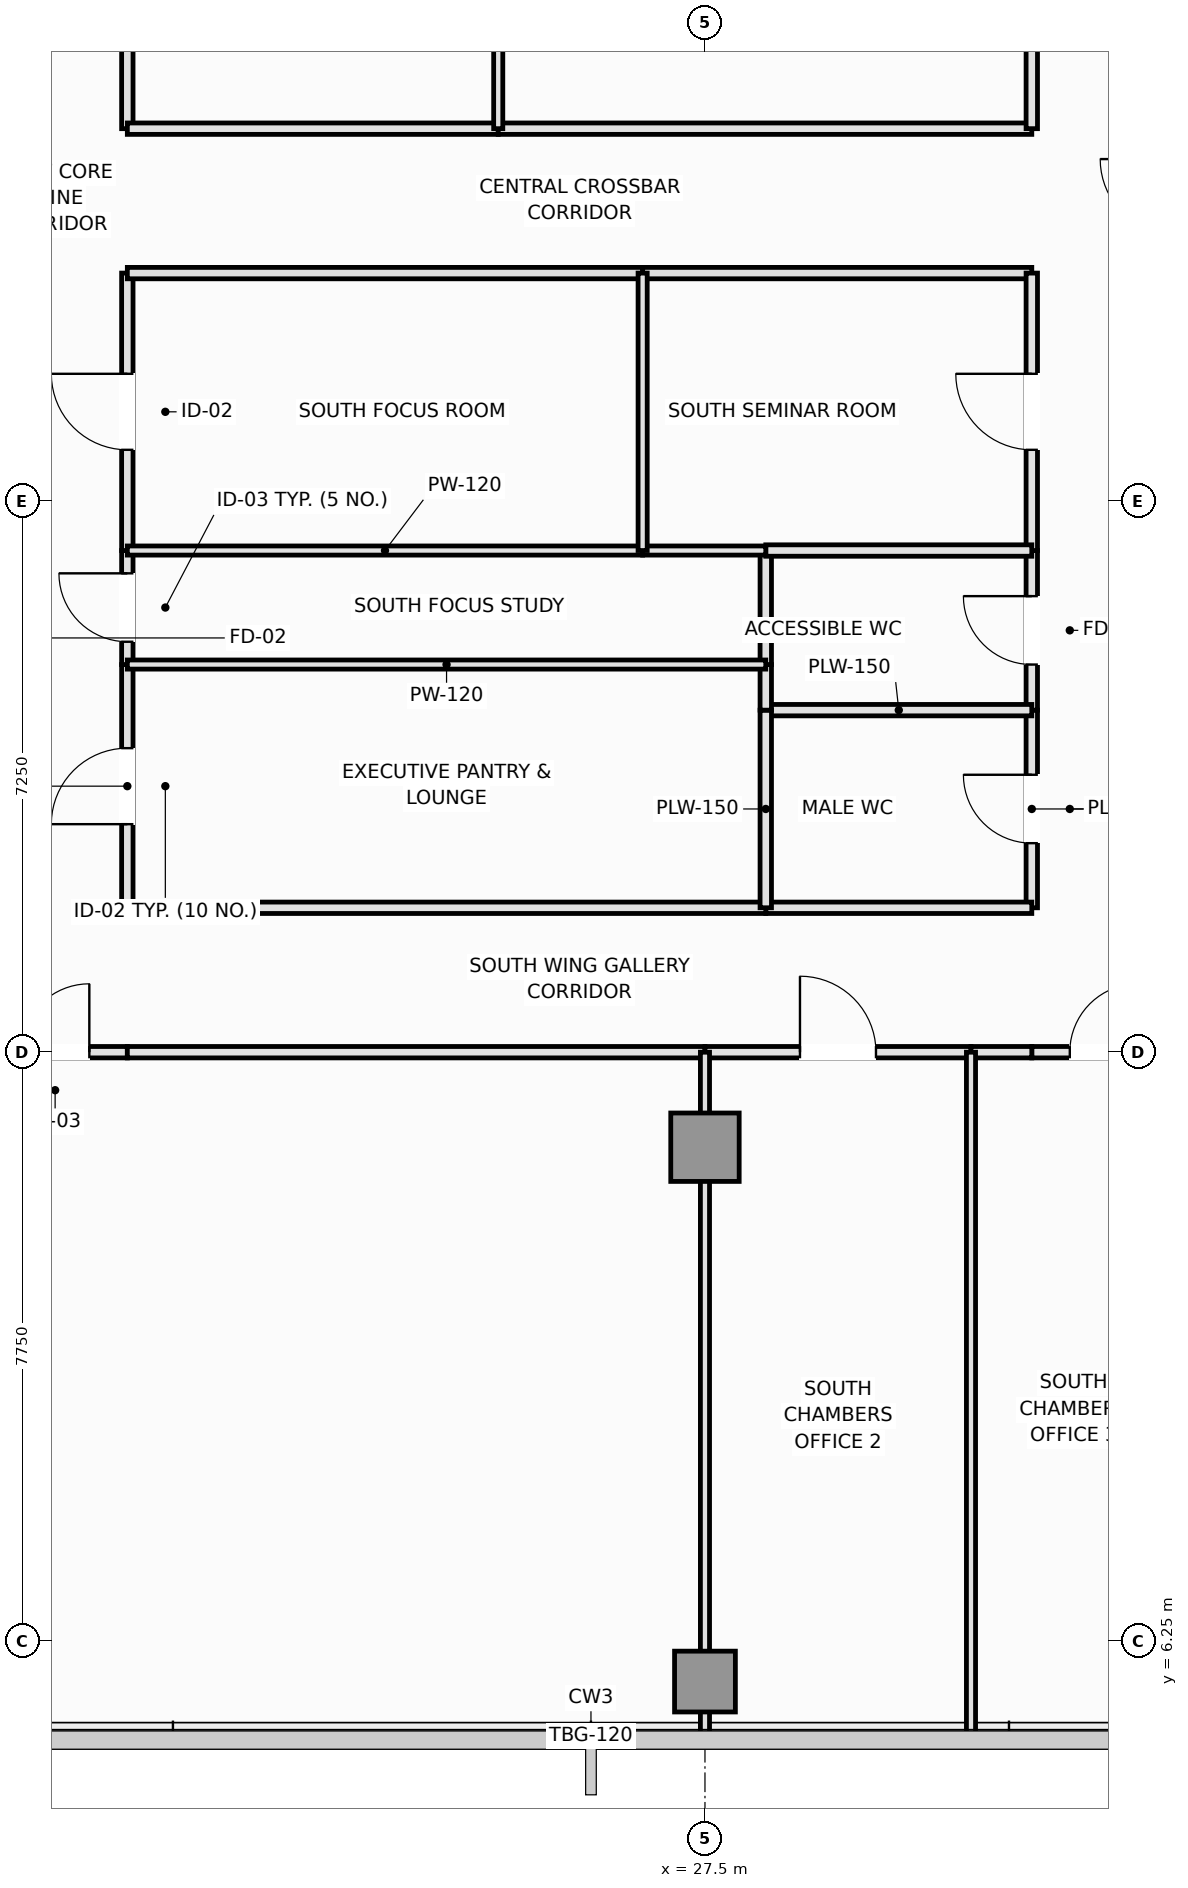
"""IFC4 building model, lengths in metres.
Left out: names, types, materials, properties, quantities, classifications, styles, units other than length and angle.
Written with IfcOpenShell. Run it as: python <this file> out.ifc"""

import sys

from ifc_helpers import new_model, si_unit, direction, frame, frame_2d, origin, origin_2d, place, context, subcontext, project, spatial, rectangle, extrude, element, fill, save


model = new_model("IFC4")
c1 = context("Model", 3, precision=1e-05, world=origin(), true_north=direction((0.0, 1.0)))
c2 = subcontext(c1, "Body", "Model", "MODEL_VIEW")
j1 = project(units=[si_unit("LENGTHUNIT", "METRE"), si_unit("PLANEANGLEUNIT", "RADIAN")], contexts=[c1])
p1 = place(None, origin())
s1 = spatial("IfcSite", under=j1, at=p1, CompositionType="ELEMENT")
p2 = place(p1, origin())
s2 = spatial("IfcBuilding", under=s1, at=p2, CompositionType="ELEMENT")
p3 = place(p2, frame((0.0, 0.0, 212.9)))
s3 = spatial("IfcBuildingStorey", under=s2, at=p3, CompositionType="ELEMENT", Elevation=212.9)
p4 = place(p3, frame((27.5, 12.75, 0.0), z_axis=(0.0, 0.0, 1.0), x_axis=(1.0, 0.0, 0.0)))
e1 = element("IfcColumn", 1, at=p4, inside=s3, PredefinedType="COLUMN", context=c2, shape_type="SweptSolid", body=[
    extrude(rectangle(XDim=0.9, YDim=0.9, at=origin_2d()), origin(), (0.0, 0.0, 1.0), 3.55),
])
p5 = place(p3, frame((27.5, 5.72, 0.0), z_axis=(0.0, 0.0, 1.0), x_axis=(1.0, 0.0, 0.0)))
e2 = element("IfcColumn", 2, at=p5, inside=s3, PredefinedType="COLUMN", context=c2, shape_type="SweptSolid", body=[
    extrude(rectangle(XDim=0.8, YDim=0.8, at=origin_2d()), origin(), (0.0, 0.0, 1.0), 3.55),
])
p6 = place(p3, frame((19.9, 15.9, 0.0), z_axis=(0.0, 0.0, 1.0), x_axis=(0.0, 1.0, 0.0)))
e3 = element("IfcWall", 3, at=p6, inside=s3, PredefinedType="PARTITIONING", context=c2, shape_type="SweptSolid", body=[
    extrude(rectangle(XDim=3.2, YDim=0.15, at=frame_2d((1.6, 0.0))), origin(), (0.0, 0.0, 1.0), 3.37),
])
p7 = place(p6, frame((1.1, 0.0, 0.0)))
e4 = element("IfcOpeningElement", 4, at=p7, cuts=e3, PredefinedType="OPENING", context=c2, shape_type="SweptSolid", body=[
    extrude(rectangle(XDim=1.0, YDim=2.15, at=frame_2d((0.5, 1.075))), frame((0.0, 0.085, 0.0), z_axis=(0.0, -1.0, 0.0), x_axis=(1.0, 0.0, 0.0)), (0.0, 0.0, 1.0), 0.17),
])
p8 = place(p3, frame((19.9, 19.1, 0.0), z_axis=(0.0, 0.0, 1.0), x_axis=(0.0, 1.0, 0.0)))
e5 = element("IfcWall", 5, at=p8, inside=s3, PredefinedType="PARTITIONING", context=c2, shape_type="SweptSolid", body=[
    extrude(rectangle(XDim=1.5, YDim=0.15, at=frame_2d((0.75, 0.0))), origin(), (0.0, 0.0, 1.0), 3.37),
])
p9 = place(p8, frame((0.3, 0.0, 0.0)))
e6 = element("IfcOpeningElement", 6, at=p9, cuts=e5, PredefinedType="OPENING", context=c2, shape_type="SweptSolid", body=[
    extrude(rectangle(XDim=0.9, YDim=2.1, at=frame_2d((0.45, 1.05))), frame((0.0, 0.085, 0.0), z_axis=(0.0, -1.0, 0.0), x_axis=(1.0, 0.0, 0.0)), (0.0, 0.0, 1.0), 0.17),
])
p10 = place(p3, frame((19.9, 20.6, 0.0), z_axis=(0.0, 0.0, 1.0), x_axis=(0.0, 1.0, 0.0)))
e7 = element("IfcWall", 7, at=p10, inside=s3, PredefinedType="PARTITIONING", context=c2, shape_type="SweptSolid", body=[
    extrude(rectangle(XDim=3.65, YDim=0.15, at=frame_2d((1.825, 0.0))), origin(), (0.0, 0.0, 1.0), 3.37),
])
p11 = place(p10, frame((1.325, 0.0, 0.0)))
e8 = element("IfcOpeningElement", 8, at=p11, cuts=e7, PredefinedType="OPENING", context=c2, shape_type="SweptSolid", body=[
    extrude(rectangle(XDim=1.0, YDim=2.15, at=frame_2d((0.5, 1.075))), frame((0.0, 0.085, 0.0), z_axis=(0.0, -1.0, 0.0), x_axis=(1.0, 0.0, 0.0)), (0.0, 0.0, 1.0), 0.17),
])
p12 = place(p3, frame((19.9, 26.15, 0.0), z_axis=(0.0, 0.0, 1.0), x_axis=(0.0, 1.0, 0.0)))
e9 = element("IfcWall", 9, at=p12, inside=s3, PredefinedType="PARTITIONING", context=c2, shape_type="SweptSolid", body=[
    extrude(rectangle(XDim=3.75, YDim=0.15, at=frame_2d((1.875, 0.0))), origin(), (0.0, 0.0, 1.0), 3.37),
])
p13 = place(p12, frame((1.375, 0.0, 0.0)))
e10 = element("IfcOpeningElement", 10, at=p13, cuts=e9, PredefinedType="OPENING", context=c2, shape_type="SweptSolid", body=[
    extrude(rectangle(XDim=1.0, YDim=2.15, at=frame_2d((0.5, 1.075))), frame((0.0, 0.085, 0.0), z_axis=(0.0, -1.0, 0.0), x_axis=(1.0, 0.0, 0.0)), (0.0, 0.0, 1.0), 0.17),
])
p14 = place(p3, frame((18.0, 14.0, 0.0), z_axis=(0.0, 0.0, 1.0), x_axis=(1.0, 0.0, 0.0)))
e11 = element("IfcWall", 11, at=p14, inside=s3, PredefinedType="PARTITIONING", context=c2, shape_type="SweptSolid", body=[
    extrude(rectangle(XDim=1.9, YDim=0.15, at=frame_2d((0.95, 0.0))), origin(), (0.0, 0.0, 1.0), 3.37),
])
p15 = place(p14, frame((0.5, 0.0, 0.0)))
e12 = element("IfcOpeningElement", 12, at=p15, cuts=e11, PredefinedType="OPENING", context=c2, shape_type="SweptSolid", body=[
    extrude(rectangle(XDim=0.9, YDim=2.1, at=frame_2d((0.45, 1.05))), frame((0.0, 0.085, 0.0), z_axis=(0.0, -1.0, 0.0), x_axis=(1.0, 0.0, 0.0)), (0.0, 0.0, 1.0), 0.17),
])
p16 = place(p3, frame((19.9, 24.25, 0.0), z_axis=(0.0, 0.0, 1.0), x_axis=(1.0, 0.0, 0.0)))
e13 = element("IfcWall", 13, at=p16, inside=s3, PredefinedType="PARTITIONING", context=c2, shape_type="SweptSolid", body=[
    extrude(rectangle(XDim=6.78, YDim=0.15, at=frame_2d((3.39, 0.0))), origin(), (0.0, 0.0, 1.0), 3.37),
])
p17 = place(p3, frame((26.68, 24.25, 0.0), z_axis=(0.0, 0.0, 1.0), x_axis=(1.0, 0.0, 0.0)))
e14 = element("IfcWall", 14, at=p17, inside=s3, PredefinedType="PARTITIONING", context=c2, shape_type="SweptSolid", body=[
    extrude(rectangle(XDim=5.12, YDim=0.15, at=frame_2d((2.56, 0.0))), origin(), (0.0, 0.0, 1.0), 3.37),
])
p18 = place(p3, frame((19.9, 26.15, 0.0), z_axis=(0.0, 0.0, 1.0), x_axis=(1.0, 0.0, 0.0)))
e15 = element("IfcWall", 15, at=p18, inside=s3, PredefinedType="PARTITIONING", context=c2, shape_type="SweptSolid", body=[
    extrude(rectangle(XDim=4.88, YDim=0.15, at=frame_2d((2.44, 0.0))), origin(), (0.0, 0.0, 1.0), 3.37),
])
p19 = place(p3, frame((24.78, 26.15, 0.0), z_axis=(0.0, 0.0, 1.0), x_axis=(1.0, 0.0, 0.0)))
e16 = element("IfcWall", 16, at=p19, inside=s3, PredefinedType="PARTITIONING", context=c2, shape_type="SweptSolid", body=[
    extrude(rectangle(XDim=7.02, YDim=0.15, at=frame_2d((3.51, 0.0))), origin(), (0.0, 0.0, 1.0), 3.37),
])
p20 = place(p3, frame((31.8, 15.9, 0.0), z_axis=(0.0, 0.0, 1.0), x_axis=(0.0, 1.0, 0.0)))
e17 = element("IfcWall", 17, at=p20, inside=s3, PredefinedType="PLUMBINGWALL", context=c2, shape_type="SweptSolid", body=[
    extrude(rectangle(XDim=2.6, YDim=0.15, at=frame_2d((1.3, 0.0))), origin(), (0.0, 0.0, 1.0), 3.37),
])
p21 = place(p20, frame((0.85, 0.0, 0.0)))
e18 = element("IfcOpeningElement", 18, at=p21, cuts=e17, PredefinedType="OPENING", context=c2, shape_type="SweptSolid", body=[
    extrude(rectangle(XDim=0.9, YDim=2.1, at=frame_2d((0.45, 1.05))), frame((0.0, 0.085, 0.0), z_axis=(0.0, -1.0, 0.0), x_axis=(1.0, 0.0, 0.0)), (0.0, 0.0, 1.0), 0.17),
])
p22 = place(p3, frame((31.8, 18.5, 0.0), z_axis=(0.0, 0.0, 1.0), x_axis=(0.0, 1.0, 0.0)))
e19 = element("IfcWall", 19, at=p22, inside=s3, PredefinedType="PLUMBINGWALL", context=c2, shape_type="SweptSolid", body=[
    extrude(rectangle(XDim=2.1, YDim=0.15, at=frame_2d((1.05, 0.0))), origin(), (0.0, 0.0, 1.0), 3.37),
])
p23 = place(p22, frame((0.6, 0.0, 0.0)))
e20 = element("IfcOpeningElement", 20, at=p23, cuts=e19, PredefinedType="OPENING", context=c2, shape_type="SweptSolid", body=[
    extrude(rectangle(XDim=0.9, YDim=2.1, at=frame_2d((0.45, 1.05))), frame((0.0, 0.085, 0.0), z_axis=(0.0, -1.0, 0.0), x_axis=(1.0, 0.0, 0.0)), (0.0, 0.0, 1.0), 0.17),
])
p24 = place(p3, frame((31.8, 20.6, 0.0), z_axis=(0.0, 0.0, 1.0), x_axis=(0.0, 1.0, 0.0)))
e21 = element("IfcWall", 21, at=p24, inside=s3, PredefinedType="PARTITIONING", context=c2, shape_type="SweptSolid", body=[
    extrude(rectangle(XDim=3.65, YDim=0.15, at=frame_2d((1.825, 0.0))), origin(), (0.0, 0.0, 1.0), 3.37),
])
p25 = place(p24, frame((1.325, 0.0, 0.0)))
e22 = element("IfcOpeningElement", 22, at=p25, cuts=e21, PredefinedType="OPENING", context=c2, shape_type="SweptSolid", body=[
    extrude(rectangle(XDim=1.0, YDim=2.15, at=frame_2d((0.5, 1.075))), frame((0.0, 0.085, 0.0), z_axis=(0.0, -1.0, 0.0), x_axis=(1.0, 0.0, 0.0)), (0.0, 0.0, 1.0), 0.17),
])
p26 = place(p3, frame((31.8, 26.15, 0.0), z_axis=(0.0, 0.0, 1.0), x_axis=(0.0, 1.0, 0.0)))
e23 = element("IfcWall", 23, at=p26, inside=s3, PredefinedType="PARTITIONING", context=c2, shape_type="SweptSolid", body=[
    extrude(rectangle(XDim=3.75, YDim=0.15, at=frame_2d((1.875, 0.0))), origin(), (0.0, 0.0, 1.0), 3.37),
])
p27 = place(p26, frame((1.375, 0.0, 0.0)))
e24 = element("IfcOpeningElement", 24, at=p27, cuts=e23, PredefinedType="OPENING", context=c2, shape_type="SweptSolid", body=[
    extrude(rectangle(XDim=1.0, YDim=2.15, at=frame_2d((0.5, 1.075))), frame((0.0, 0.085, 0.0), z_axis=(0.0, -1.0, 0.0), x_axis=(1.0, 0.0, 0.0)), (0.0, 0.0, 1.0), 0.17),
])
p28 = place(p3, frame((31.8, 14.0, 0.0), z_axis=(0.0, 0.0, 1.0), x_axis=(1.0, 0.0, 0.0)))
e25 = element("IfcWall", 25, at=p28, inside=s3, PredefinedType="PARTITIONING", context=c2, shape_type="SweptSolid", body=[
    extrude(rectangle(XDim=1.9, YDim=0.15, at=frame_2d((0.95, 0.0))), origin(), (0.0, 0.0, 1.0), 3.37),
])
p29 = place(p28, frame((0.5, 0.0, 0.0)))
e26 = element("IfcOpeningElement", 26, at=p29, cuts=e25, PredefinedType="OPENING", context=c2, shape_type="SweptSolid", body=[
    extrude(rectangle(XDim=0.9, YDim=2.1, at=frame_2d((0.45, 1.05))), frame((0.0, 0.085, 0.0), z_axis=(0.0, -1.0, 0.0), x_axis=(1.0, 0.0, 0.0)), (0.0, 0.0, 1.0), 0.17),
])
p30 = place(p3, frame((28.3, 15.9, 0.0), z_axis=(0.0, 0.0, 1.0), x_axis=(1.0, 0.0, 0.0)))
e27 = element("IfcWall", 27, at=p30, inside=s3, PredefinedType="PLUMBINGWALL", context=c2, shape_type="SweptSolid", body=[
    extrude(rectangle(XDim=3.5, YDim=0.15, at=frame_2d((1.75, 0.0))), origin(), (0.0, 0.0, 1.0), 3.37),
])
p31 = place(p3, frame((19.9, 15.9, 0.0), z_axis=(0.0, 0.0, 1.0), x_axis=(1.0, 0.0, 0.0)))
e28 = element("IfcWall", 28, at=p31, inside=s3, PredefinedType="PARTITIONING", context=c2, shape_type="SweptSolid", body=[
    extrude(rectangle(XDim=8.4, YDim=0.15, at=frame_2d((4.2, 0.0))), origin(), (0.0, 0.0, 1.0), 3.37),
])
p32 = place(p3, frame((19.9, 14.0, 0.0), z_axis=(0.0, 0.0, 1.0), x_axis=(1.0, 0.0, 0.0)))
e29 = element("IfcWall", 29, at=p32, inside=s3, PredefinedType="PARTITIONING", context=c2, shape_type="SweptSolid", body=[
    extrude(rectangle(XDim=7.6, YDim=0.15, at=frame_2d((3.8, 0.0))), origin(), (0.0, 0.0, 1.0), 3.37),
])
p33 = place(p3, frame((27.5, 14.0, 0.0), z_axis=(0.0, 0.0, 1.0), x_axis=(1.0, 0.0, 0.0)))
e30 = element("IfcWall", 30, at=p33, inside=s3, PredefinedType="PARTITIONING", context=c2, shape_type="SweptSolid", body=[
    extrude(rectangle(XDim=3.5, YDim=0.15, at=frame_2d((1.75, 0.0))), origin(), (0.0, 0.0, 1.0), 3.37),
])
p34 = place(p33, frame((1.25, 0.0, 0.0)))
e31 = element("IfcOpeningElement", 31, at=p34, cuts=e30, PredefinedType="OPENING", context=c2, shape_type="SweptSolid", body=[
    extrude(rectangle(XDim=1.0, YDim=2.15, at=frame_2d((0.5, 1.075))), frame((0.0, 0.085, 0.0), z_axis=(0.0, -1.0, 0.0), x_axis=(1.0, 0.0, 0.0)), (0.0, 0.0, 1.0), 0.17),
])
p35 = place(p3, frame((31.0, 14.0, 0.0), z_axis=(0.0, 0.0, 1.0), x_axis=(1.0, 0.0, 0.0)))
e32 = element("IfcWall", 32, at=p35, inside=s3, PredefinedType="PARTITIONING", context=c2, shape_type="SweptSolid", body=[
    extrude(rectangle(XDim=0.8, YDim=0.15, at=frame_2d((0.4, 0.0))), origin(), (0.0, 0.0, 1.0), 3.37),
])
p36 = place(p3, frame((28.3, 18.5, 0.0), z_axis=(0.0, 0.0, 1.0), x_axis=(1.0, 0.0, 0.0)))
e33 = element("IfcWall", 33, at=p36, inside=s3, PredefinedType="PLUMBINGWALL", context=c2, shape_type="SweptSolid", body=[
    extrude(rectangle(XDim=3.5, YDim=0.15, at=frame_2d((1.75, 0.0))), origin(), (0.0, 0.0, 1.0), 2.87),
])
p37 = place(p3, frame((28.3, 15.9, 0.0), z_axis=(0.0, 0.0, 1.0), x_axis=(0.0, 1.0, 0.0)))
e34 = element("IfcWall", 34, at=p37, inside=s3, PredefinedType="PLUMBINGWALL", context=c2, shape_type="SweptSolid", body=[
    extrude(rectangle(XDim=2.6, YDim=0.15, at=frame_2d((1.3, 0.0))), origin(), (0.0, 0.0, 1.0), 3.37),
])
p38 = place(p3, frame((28.3, 18.5, 0.0), z_axis=(0.0, 0.0, 1.0), x_axis=(0.0, 1.0, 0.0)))
e35 = element("IfcWall", 35, at=p38, inside=s3, PredefinedType="PLUMBINGWALL", context=c2, shape_type="SweptSolid", body=[
    extrude(rectangle(XDim=0.6, YDim=0.15, at=frame_2d((0.3, 0.0))), origin(), (0.0, 0.0, 1.0), 3.37),
])
p39 = place(p3, frame((28.3, 19.1, 0.0), z_axis=(0.0, 0.0, 1.0), x_axis=(0.0, 1.0, 0.0)))
e36 = element("IfcWall", 36, at=p39, inside=s3, PredefinedType="PLUMBINGWALL", context=c2, shape_type="SweptSolid", body=[
    extrude(rectangle(XDim=1.5, YDim=0.15, at=frame_2d((0.75, 0.0))), origin(), (0.0, 0.0, 1.0), 3.37),
])
p40 = place(p3, frame((28.3, 20.6, 0.0), z_axis=(0.0, 0.0, 1.0), x_axis=(1.0, 0.0, 0.0)))
e37 = element("IfcWall", 37, at=p40, inside=s3, PredefinedType="PLUMBINGWALL", context=c2, shape_type="SweptSolid", body=[
    extrude(rectangle(XDim=3.5, YDim=0.15, at=frame_2d((1.75, 0.0))), origin(), (0.0, 0.0, 1.0), 3.37),
])
p41 = place(p3, frame((19.9, 19.1, 0.0), z_axis=(0.0, 0.0, 1.0), x_axis=(1.0, 0.0, 0.0)))
e38 = element("IfcWall", 38, at=p41, inside=s3, PredefinedType="PARTITIONING", context=c2, shape_type="SweptSolid", body=[
    extrude(rectangle(XDim=8.4, YDim=0.12, at=frame_2d((4.2, 0.0))), origin(), (0.0, 0.0, 1.0), 3.37),
])
p42 = place(p3, frame((19.9, 20.6, 0.0), z_axis=(0.0, 0.0, 1.0), x_axis=(1.0, 0.0, 0.0)))
e39 = element("IfcWall", 39, at=p42, inside=s3, PredefinedType="PARTITIONING", context=c2, shape_type="SweptSolid", body=[
    extrude(rectangle(XDim=6.78, YDim=0.12, at=frame_2d((3.39, 0.0))), origin(), (0.0, 0.0, 1.0), 3.37),
])
p43 = place(p3, frame((26.68, 20.6, 0.0), z_axis=(0.0, 0.0, 1.0), x_axis=(1.0, 0.0, 0.0)))
e40 = element("IfcWall", 40, at=p43, inside=s3, PredefinedType="PARTITIONING", context=c2, shape_type="SweptSolid", body=[
    extrude(rectangle(XDim=1.62, YDim=0.12, at=frame_2d((0.81, 0.0))), origin(), (0.0, 0.0, 1.0), 3.37),
])
p44 = place(p3, frame((26.68, 20.6, 0.0), z_axis=(0.0, 0.0, 1.0), x_axis=(0.0, 1.0, 0.0)))
e41 = element("IfcWall", 41, at=p44, inside=s3, PredefinedType="PARTITIONING", context=c2, shape_type="SweptSolid", body=[
    extrude(rectangle(XDim=3.65, YDim=0.12, at=frame_2d((1.825, 0.0))), origin(), (0.0, 0.0, 1.0), 3.37),
])
p45 = place(p3, frame((24.78, 26.15, 0.0), z_axis=(0.0, 0.0, 1.0), x_axis=(0.0, 1.0, 0.0)))
e42 = element("IfcWall", 42, at=p45, inside=s3, PredefinedType="PARTITIONING", context=c2, shape_type="SweptSolid", body=[
    extrude(rectangle(XDim=3.75, YDim=0.12, at=frame_2d((1.875, 0.0))), origin(), (0.0, 0.0, 1.0), 3.37),
])
p46 = place(p3, frame((27.5, 5.01, 0.0), z_axis=(0.0, 0.0, 1.0), x_axis=(0.0, 1.0, 0.0)))
e43 = element("IfcWall", 43, at=p46, inside=s3, PredefinedType="PARTITIONING", context=c2, shape_type="SweptSolid", body=[
    extrude(rectangle(XDim=8.99, YDim=0.12, at=frame_2d((4.495, 0.0))), origin(), (0.0, 0.0, 1.0), 2.92),
])
p47 = place(p3, frame((31.0, 5.01, 0.0), z_axis=(0.0, 0.0, 1.0), x_axis=(0.0, 1.0, 0.0)))
e44 = element("IfcWall", 44, at=p47, inside=s3, PredefinedType="PARTITIONING", context=c2, shape_type="SweptSolid", body=[
    extrude(rectangle(XDim=8.99, YDim=0.12, at=frame_2d((4.495, 0.0))), origin(), (0.0, 0.0, 1.0), 3.37),
])
p48 = place(p7, origin())
e45 = element("IfcDoor", 45, at=p48, inside=s3, OperationType="SINGLE_SWING_LEFT", PredefinedType="DOOR", context=c2, shape_type="SweptSolid", body=[
    extrude(rectangle(XDim=1.0, YDim=2.15, at=frame_2d((0.5, 1.075))), frame((0.0, 0.025, 0.0), z_axis=(0.0, -1.0, 0.0), x_axis=(1.0, 0.0, 0.0)), (0.0, 0.0, 1.0), 0.05),
])
fill(e4, e45)
p49 = place(p9, origin())
e46 = element("IfcDoor", 46, at=p49, inside=s3, OperationType="SINGLE_SWING_RIGHT", PredefinedType="DOOR", context=c2, shape_type="SweptSolid", body=[
    extrude(rectangle(XDim=0.9, YDim=2.1, at=frame_2d((0.45, 1.05))), frame((0.0, 0.025, 0.0), z_axis=(0.0, -1.0, 0.0), x_axis=(1.0, 0.0, 0.0)), (0.0, 0.0, 1.0), 0.05),
])
fill(e6, e46)
p50 = place(p11, origin())
e47 = element("IfcDoor", 47, at=p50, inside=s3, OperationType="SINGLE_SWING_RIGHT", PredefinedType="DOOR", context=c2, shape_type="SweptSolid", body=[
    extrude(rectangle(XDim=1.0, YDim=2.15, at=frame_2d((0.5, 1.075))), frame((0.0, 0.025, 0.0), z_axis=(0.0, -1.0, 0.0), x_axis=(1.0, 0.0, 0.0)), (0.0, 0.0, 1.0), 0.05),
])
fill(e8, e47)
p51 = place(p15, origin())
e48 = element("IfcDoor", 48, at=p51, inside=s3, OperationType="SINGLE_SWING_RIGHT", PredefinedType="DOOR", context=c2, shape_type="SweptSolid", body=[
    extrude(rectangle(XDim=0.9, YDim=2.1, at=frame_2d((0.45, 1.05))), frame((0.0, 0.025, 0.0), z_axis=(0.0, -1.0, 0.0), x_axis=(1.0, 0.0, 0.0)), (0.0, 0.0, 1.0), 0.05),
])
fill(e12, e48)
p52 = place(p21, origin())
e49 = element("IfcDoor", 49, at=p52, inside=s3, OperationType="SINGLE_SWING_RIGHT", PredefinedType="DOOR", context=c2, shape_type="SweptSolid", body=[
    extrude(rectangle(XDim=0.9, YDim=2.1, at=frame_2d((0.45, 1.05))), frame((0.0, 0.025, 0.0), z_axis=(0.0, -1.0, 0.0), x_axis=(1.0, 0.0, 0.0)), (0.0, 0.0, 1.0), 0.05),
])
fill(e18, e49)
p53 = place(p23, origin())
e50 = element("IfcDoor", 50, at=p53, inside=s3, OperationType="SINGLE_SWING_RIGHT", PredefinedType="DOOR", context=c2, shape_type="SweptSolid", body=[
    extrude(rectangle(XDim=0.9, YDim=2.1, at=frame_2d((0.45, 1.05))), frame((0.0, 0.025, 0.0), z_axis=(0.0, -1.0, 0.0), x_axis=(1.0, 0.0, 0.0)), (0.0, 0.0, 1.0), 0.05),
])
fill(e20, e50)
p54 = place(p25, origin())
e51 = element("IfcDoor", 51, at=p54, inside=s3, OperationType="SINGLE_SWING_RIGHT", PredefinedType="DOOR", context=c2, shape_type="SweptSolid", body=[
    extrude(rectangle(XDim=1.0, YDim=2.15, at=frame_2d((0.5, 1.075))), frame((0.0, 0.025, 0.0), z_axis=(0.0, -1.0, 0.0), x_axis=(1.0, 0.0, 0.0)), (0.0, 0.0, 1.0), 0.05),
])
fill(e22, e51)
p55 = place(p29, origin())
e52 = element("IfcDoor", 52, at=p55, inside=s3, OperationType="SINGLE_SWING_RIGHT", PredefinedType="DOOR", context=c2, shape_type="SweptSolid", body=[
    extrude(rectangle(XDim=0.9, YDim=2.1, at=frame_2d((0.45, 1.05))), frame((0.0, 0.025, 0.0), z_axis=(0.0, -1.0, 0.0), x_axis=(1.0, 0.0, 0.0)), (0.0, 0.0, 1.0), 0.05),
])
fill(e26, e52)
p56 = place(p34, origin())
e53 = element("IfcDoor", 53, at=p56, inside=s3, OperationType="SINGLE_SWING_LEFT", PredefinedType="DOOR", context=c2, shape_type="SweptSolid", body=[
    extrude(rectangle(XDim=1.0, YDim=2.15, at=frame_2d((0.5, 1.075))), frame((0.0, 0.025, 0.0), z_axis=(0.0, -1.0, 0.0), x_axis=(1.0, 0.0, 0.0)), (0.0, 0.0, 1.0), 0.05),
])
fill(e31, e53)
save(model, sys.argv[1])
